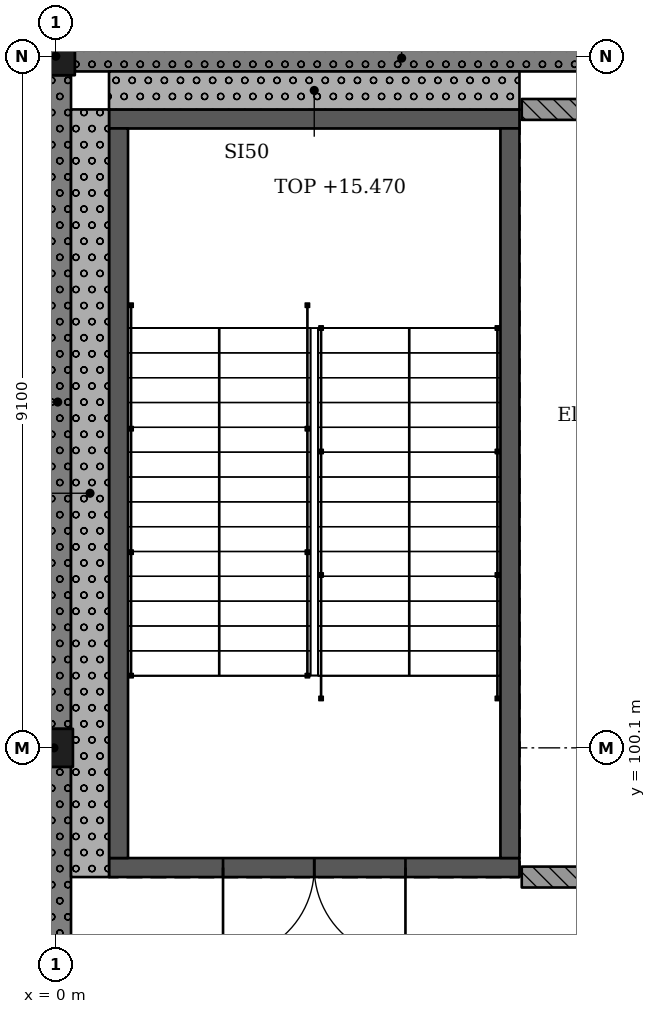
"""IFC4 building model, lengths in metres.
Left out: names, types, materials, properties, quantities, classifications, styles, units other than length and angle.
Written with IfcOpenShell. Run it as: python <this file> out.ifc"""

import sys

from ifc_helpers import new_model, si_unit, direction, frame, frame_2d, origin, origin_2d, place, context, subcontext, project, spatial, rectangle, extrude, element, fill, save


model = new_model("IFC4")
c1 = context("Model", 3, precision=1e-05, world=origin(), true_north=direction((0.0, 1.0)))
c2 = subcontext(c1, "Body", "Model", "MODEL_VIEW")
j1 = project(units=[si_unit("LENGTHUNIT", "METRE"), si_unit("PLANEANGLEUNIT", "RADIAN")], contexts=[c1])
p1 = place(None, origin())
s1 = spatial("IfcSite", under=j1, at=p1, CompositionType="ELEMENT")
p2 = place(p1, origin())
s2 = spatial("IfcBuilding", under=s1, at=p2, CompositionType="ELEMENT")
p3 = place(p2, frame((0.0, 0.0, 10.92)))
s3 = spatial("IfcBuildingStorey", under=s2, at=p3, CompositionType="ELEMENT", Elevation=10.92)
for number, where, z_axis, x_axis in (
    (1, (-0.025, 100.1, 0.0), (0.0, 0.0, 1.0), (1.0, 0.0, 0.0)),
    (2, (0.0, 109.2, 0.0), (0.0, 0.0, 1.0), (1.0, 0.0, 0.0)),
):
    element("IfcColumn", number, at=place(p3, frame(where, z_axis=z_axis, x_axis=x_axis)), inside=s3, PredefinedType="COLUMN", context=c2, shape_type="SweptSolid", body=[
        extrude(rectangle(XDim=0.5, YDim=0.5, at=origin_2d()), origin(), (0.0, 0.0, 1.0), 4.55),
    ])
p4 = place(p3, frame((6.1, 98.525, 0.0), z_axis=(0.0, 0.0, 1.0), x_axis=(-1.0, 0.0, 0.0)))
e3 = element("IfcWall", 3, at=p4, inside=s3, PredefinedType="SHEAR", context=c2, shape_type="SweptSolid", body=[
    extrude(rectangle(XDim=5.4, YDim=0.25, at=frame_2d((2.7, 0.0))), origin(), (0.0, 0.0, 1.0), 4.55),
])
p5 = place(p4, frame((1.5, 0.0, 0.0)))
e4 = element("IfcOpeningElement", 4, at=p5, cuts=e3, PredefinedType="OPENING", context=c2, shape_type="SweptSolid", body=[
    extrude(rectangle(XDim=2.4, YDim=2.1, at=frame_2d((1.2, 1.05))), frame((0.0, 0.135, 0.0), z_axis=(0.0, -1.0, 0.0), x_axis=(1.0, 0.0, 0.0)), (0.0, 0.0, 1.0), 0.27),
])
p6 = place(p3, frame((6.1, 108.375, 0.0), z_axis=(0.0, 0.0, 1.0), x_axis=(-1.0, 0.0, 0.0)))
e5 = element("IfcWall", 5, at=p6, inside=s3, PredefinedType="SHEAR", context=c2, shape_type="SweptSolid", body=[
    extrude(rectangle(XDim=5.4, YDim=0.25, at=frame_2d((2.7, 0.0))), origin(), (0.0, 0.0, 1.0), 4.55),
])
for number, where, z_axis, x_axis in (
    (6, (0.825, 108.25, 0.0), (0.0, 0.0, 1.0), (0.0, -1.0, 0.0)),
    (7, (5.975, 108.25, 0.0), (0.0, 0.0, 1.0), (0.0, -1.0, 0.0)),
):
    element("IfcWall", number, at=place(p3, frame(where, z_axis=z_axis, x_axis=x_axis)), inside=s3, PredefinedType="SHEAR", context=c2, shape_type="SweptSolid", body=[
        extrude(rectangle(XDim=9.6, YDim=0.25, at=frame_2d((4.8, 0.0))), origin(), (0.0, 0.0, 1.0), 4.55),
    ])
p7 = place(p3, frame((8.85, 109.175, 0.0), z_axis=(0.0, 0.0, 1.0), x_axis=(-1.0, 0.0, 0.0)))
e8 = element("IfcWall", 8, at=p7, inside=s3, PredefinedType="SOLIDWALL", context=c2, shape_type="SweptSolid", body=[
    extrude(rectangle(XDim=8.6, YDim=0.35, at=frame_2d((4.3, 0.0))), origin(), (0.0, 0.0, 1.0), 3.5),
])
p8 = place(p3, frame((0.025, 108.95, 0.0), z_axis=(0.0, 0.0, 1.0), x_axis=(0.0, -1.0, 0.0)))
e9 = element("IfcWall", 9, at=p8, inside=s3, PredefinedType="SOLIDWALL", context=c2, shape_type="SweptSolid", body=[
    extrude(rectangle(XDim=8.6, YDim=0.35, at=frame_2d((4.3, 0.0))), origin(), (0.0, 0.0, 1.0), 3.5),
])
p9 = place(p3, frame((0.025, 99.85, 0.0), z_axis=(0.0, 0.0, 1.0), x_axis=(0.0, -1.0, 0.0)))
e10 = element("IfcWall", 10, at=p9, inside=s3, PredefinedType="SOLIDWALL", context=c2, shape_type="SweptSolid", body=[
    extrude(rectangle(XDim=8.55, YDim=0.35, at=frame_2d((4.275, 0.0))), origin(), (0.0, 0.0, 1.0), 3.5),
])
p10 = place(p3, frame((0.7, 108.75, 0.0), z_axis=(0.0, 0.0, 1.0), x_axis=(1.0, 0.0, 0.0)))
e11 = element("IfcWall", 11, at=p10, inside=s3, PredefinedType="SOLIDWALL", context=c2, shape_type="SweptSolid", body=[
    extrude(rectangle(XDim=5.4, YDim=0.5, at=frame_2d((2.7, 0.0))), origin(), (0.0, 0.0, 1.0), 4.55),
])
p11 = place(p3, frame((0.45, 98.4, 0.0), z_axis=(0.0, 0.0, 1.0), x_axis=(0.0, 1.0, 0.0)))
e12 = element("IfcWall", 12, at=p11, inside=s3, PredefinedType="SOLIDWALL", context=c2, shape_type="SweptSolid", body=[
    extrude(rectangle(XDim=10.1, YDim=0.5, at=frame_2d((5.05, 0.0))), origin(), (0.0, 0.0, 1.0), 4.25),
])
p12 = place(p3, frame((6.13, 98.4, 0.0), z_axis=(0.0, 0.0, 1.0), x_axis=(1.0, 0.0, 0.0)))
e13 = element("IfcWall", 13, at=p12, inside=s3, PredefinedType="SOLIDWALL", context=c2, shape_type="SweptSolid", body=[
    extrude(rectangle(XDim=3.64, YDim=0.275, at=frame_2d((1.82, 0.0))), origin(), (0.0, 0.0, 1.0), 4.25),
])
p13 = place(p12, frame((1.25, 0.0, 0.0)))
e14 = element("IfcOpeningElement", 14, at=p13, cuts=e13, PredefinedType="OPENING", context=c2, shape_type="SweptSolid", body=[
    extrude(rectangle(XDim=1.2, YDim=2.4, at=frame_2d((0.6, 1.2))), frame((0.0, 0.147, 0.0), z_axis=(0.0, -1.0, 0.0), x_axis=(1.0, 0.0, 0.0)), (0.0, 0.0, 1.0), 0.295),
])
p14 = place(p3, frame((6.13, 108.5, 0.0), z_axis=(0.0, 0.0, 1.0), x_axis=(1.0, 0.0, 0.0)))
e15 = element("IfcWall", 15, at=p14, inside=s3, PredefinedType="SOLIDWALL", context=c2, shape_type="SweptSolid", body=[
    extrude(rectangle(XDim=3.64, YDim=0.275, at=frame_2d((1.82, 0.0))), origin(), (0.0, 0.0, 1.0), 4.25),
])
p15 = place(p5, origin())
e16 = element("IfcDoor", 16, at=p15, inside=s3, OperationType="DOUBLE_DOOR_SINGLE_SWING", PredefinedType="DOOR", context=c2, shape_type="SweptSolid", body=[
    extrude(rectangle(XDim=2.4, YDim=2.1, at=frame_2d((1.2, 1.05))), frame((0.0, 0.025, 0.0), z_axis=(0.0, -1.0, 0.0), x_axis=(1.0, 0.0, 0.0)), (0.0, 0.0, 1.0), 0.05),
])
fill(e4, e16)
save(model, sys.argv[1])
